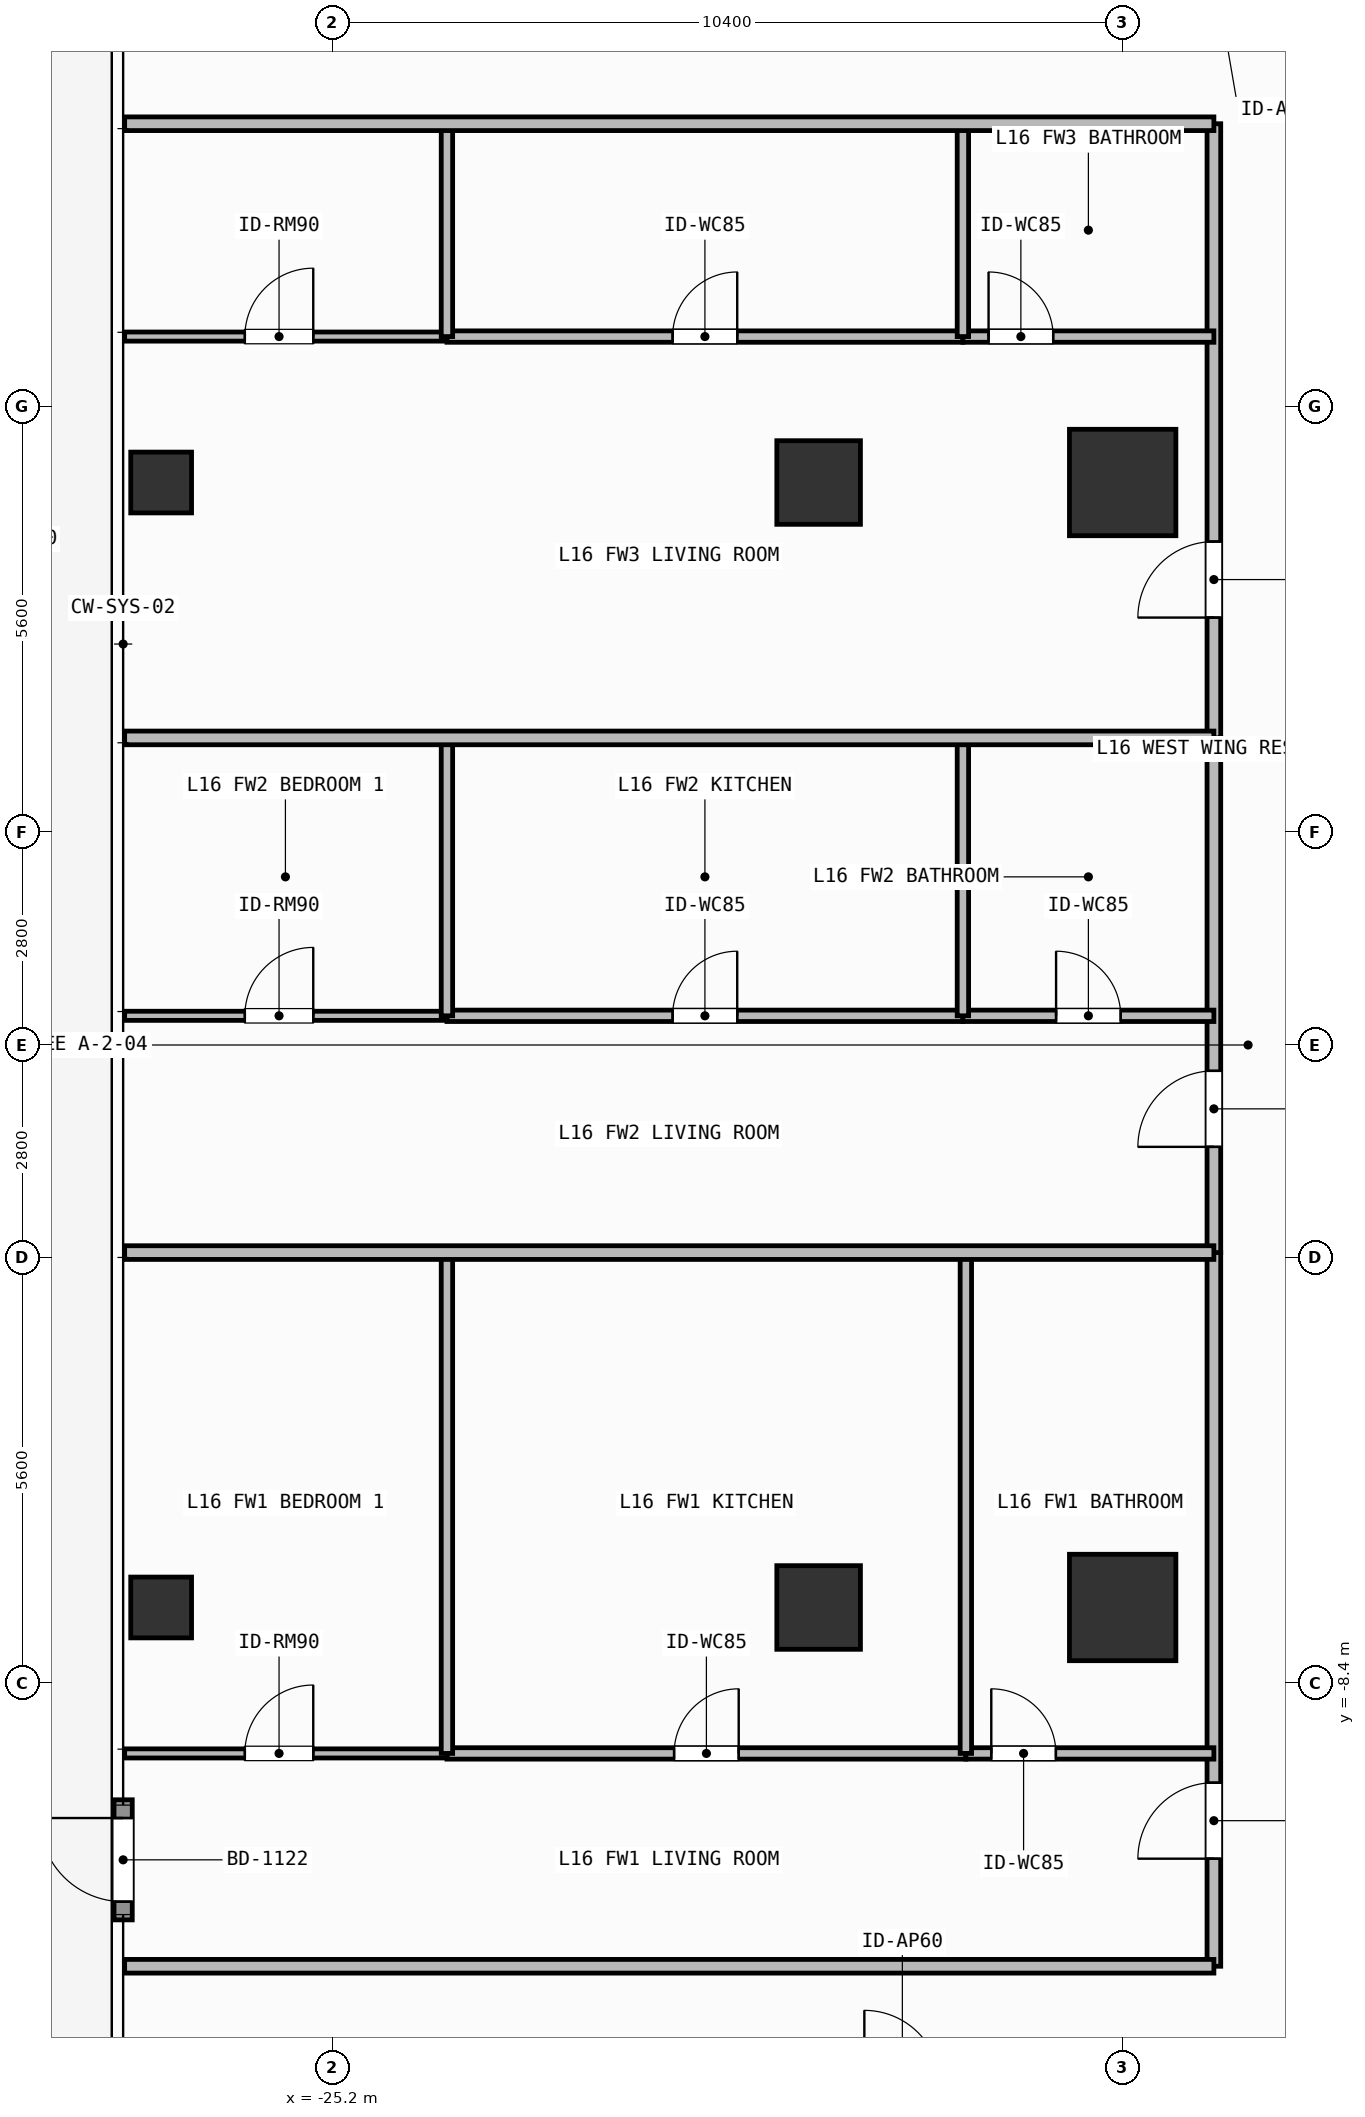
"""IFC4 building model, lengths in metres.
Left out: names, types, materials, properties, quantities, classifications, styles, units other than length and angle.
Written with IfcOpenShell. Run it as: python <this file> out.ifc"""

import sys

from ifc_helpers import new_model, si_unit, direction, frame, frame_2d, origin, origin_2d, place, context, subcontext, project, spatial, rectangle, hollow_rectangle, extrude, element, fill, save


model = new_model("IFC4")
c1 = context("Model", 3, precision=1e-05, world=origin(), true_north=direction((0.0, 1.0)))
c2 = subcontext(c1, "Body", "Model", "MODEL_VIEW")
j1 = project(units=[si_unit("LENGTHUNIT", "METRE"), si_unit("PLANEANGLEUNIT", "RADIAN")], contexts=[c1])
p1 = place(None, origin())
s1 = spatial("IfcSite", under=j1, at=p1, CompositionType="ELEMENT")
p2 = place(p1, origin())
s2 = spatial("IfcBuilding", under=s1, at=p2, CompositionType="ELEMENT")
p3 = place(p2, frame((0.0, 0.0, 61.8)))
s3 = spatial("IfcBuildingStorey", under=s2, at=p3, CompositionType="ELEMENT", Elevation=61.8)
for number, where, z_axis, x_axis in (
    (1, (-14.8, -7.4, 0.0), (0.0, 0.0, 1.0), (1.0, 0.0, 0.0)),
    (2, (-14.8, 7.4, 0.0), (0.0, 0.0, 1.0), (1.0, 0.0, 0.0)),
):
    element("IfcColumn", number, at=place(p3, frame(where, z_axis=z_axis, x_axis=x_axis)), inside=s3, PredefinedType="COLUMN", context=c2, shape_type="SweptSolid", body=[
        extrude(rectangle(XDim=1.4, YDim=1.4, at=origin_2d()), origin(), (0.0, 0.0, 1.0), 3.9),
    ])
for number, where, z_axis, x_axis in (
    (3, (-18.8, -7.4, 0.0), (0.0, 0.0, 1.0), (1.0, 0.0, 0.0)),
    (4, (-18.8, 7.4, 0.0), (0.0, 0.0, 1.0), (1.0, 0.0, 0.0)),
):
    element("IfcColumn", number, at=place(p3, frame(where, z_axis=z_axis, x_axis=x_axis)), inside=s3, PredefinedType="COLUMN", context=c2, shape_type="SweptSolid", body=[
        extrude(rectangle(XDim=1.1, YDim=1.1, at=origin_2d()), origin(), (0.0, 0.0, 1.0), 3.9),
    ])
for number, where, z_axis, x_axis in (
    (5, (-27.45, -7.4, 0.0), (0.0, 0.0, 1.0), (1.0, 0.0, 0.0)),
    (6, (-27.45, 7.4, 0.0), (0.0, 0.0, 1.0), (1.0, 0.0, 0.0)),
):
    element("IfcColumn", number, at=place(p3, frame(where, z_axis=z_axis, x_axis=x_axis)), inside=s3, PredefinedType="COLUMN", context=c2, shape_type="SweptSolid", body=[
        extrude(hollow_rectangle(XDim=0.8, YDim=0.8, WallThickness=0.036, at=origin_2d()), origin(), (0.0, 0.0, 1.0), 3.9),
    ])
p4 = place(p3, frame((-27.95, -11.51, 0.0), z_axis=(0.0, 0.0, 1.0), x_axis=(0.0, 1.0, 0.0)))
e7 = element("IfcWall", 7, at=p4, inside=s3, PredefinedType="SOLIDWALL", context=c2, shape_type="SweptSolid", body=[
    extrude(rectangle(XDim=1.58, YDim=0.24, at=frame_2d((0.79, 0.0))), origin(), (0.0, 0.0, 1.0), 3.68),
])
p5 = place(p4, frame((0.24, 0.0, 0.0)))
e8 = element("IfcOpeningElement", 8, at=p5, cuts=e7, PredefinedType="OPENING", context=c2, shape_type="SweptSolid", body=[
    extrude(rectangle(XDim=1.1, YDim=2.2, at=frame_2d((0.55, 1.1))), frame((0.0, 0.13, 0.0), z_axis=(0.0, -1.0, 0.0), x_axis=(1.0, 0.0, 0.0)), (0.0, 0.0, 1.0), 0.26),
])
p6 = place(p3, frame((-13.6, -12.12, 0.0), z_axis=(0.0, 0.0, 1.0), x_axis=(0.0, 1.0, 0.0)))
e9 = element("IfcWall", 9, at=p6, inside=s3, PredefinedType="PARTITIONING", context=c2, shape_type="SweptSolid", body=[
    extrude(rectangle(XDim=9.389, YDim=0.18, at=frame_2d((4.695, 0.0))), origin(), (0.0, 0.0, 1.0), 3.68),
])
p7 = place(p6, frame((1.415, 0.0, 0.0)))
e10 = element("IfcOpeningElement", 10, at=p7, cuts=e9, PredefinedType="OPENING", context=c2, shape_type="SweptSolid", body=[
    extrude(rectangle(XDim=1.0, YDim=2.2, at=frame_2d((0.5, 1.1))), frame((0.0, 0.1, 0.0), z_axis=(0.0, -1.0, 0.0), x_axis=(1.0, 0.0, 0.0)), (0.0, 0.0, 1.0), 0.2),
])
p8 = place(p3, frame((-23.69, -9.32, 0.0), z_axis=(0.0, 0.0, 1.0), x_axis=(1.0, 0.0, 0.0)))
e11 = element("IfcWall", 11, at=p8, inside=s3, PredefinedType="PARTITIONING", context=c2, shape_type="SweptSolid", body=[
    extrude(rectangle(XDim=6.827, YDim=0.15, at=frame_2d((3.414, 0.0))), origin(), (0.0, 0.0, 1.0), 3.68),
])
p9 = place(p8, frame((2.989, 0.0, 0.0)))
e12 = element("IfcOpeningElement", 12, at=p9, cuts=e11, PredefinedType="OPENING", context=c2, shape_type="SweptSolid", body=[
    extrude(rectangle(XDim=0.85, YDim=2.1, at=frame_2d((0.425, 1.05))), frame((0.0, 0.085, 0.0), z_axis=(0.0, -1.0, 0.0), x_axis=(1.0, 0.0, 0.0)), (0.0, 0.0, 1.0), 0.17),
])
p10 = place(p3, frame((-16.863, -9.32, 0.0), z_axis=(0.0, 0.0, 1.0), x_axis=(1.0, 0.0, 0.0)))
e13 = element("IfcWall", 13, at=p10, inside=s3, PredefinedType="PARTITIONING", context=c2, shape_type="SweptSolid", body=[
    extrude(rectangle(XDim=3.263, YDim=0.15, at=frame_2d((1.631, 0.0))), origin(), (0.0, 0.0, 1.0), 3.68),
])
p11 = place(p10, frame((0.334, 0.0, 0.0)))
e14 = element("IfcOpeningElement", 14, at=p11, cuts=e13, PredefinedType="OPENING", context=c2, shape_type="SweptSolid", body=[
    extrude(rectangle(XDim=0.85, YDim=2.1, at=frame_2d((0.425, 1.05))), frame((0.0, 0.085, 0.0), z_axis=(0.0, -1.0, 0.0), x_axis=(1.0, 0.0, 0.0)), (0.0, 0.0, 1.0), 0.17),
])
p12 = place(p3, frame((-27.93, -9.32, 0.0), z_axis=(0.0, 0.0, 1.0), x_axis=(1.0, 0.0, 0.0)))
e15 = element("IfcWall", 15, at=p12, inside=s3, PredefinedType="PARTITIONING", context=c2, shape_type="SweptSolid", body=[
    extrude(rectangle(XDim=4.24, YDim=0.12, at=frame_2d((2.12, 0.0))), origin(), (0.0, 0.0, 1.0), 3.68),
])
p13 = place(p12, frame((1.581, 0.0, 0.0)))
e16 = element("IfcOpeningElement", 16, at=p13, cuts=e15, PredefinedType="OPENING", context=c2, shape_type="SweptSolid", body=[
    extrude(rectangle(XDim=0.9, YDim=2.1, at=frame_2d((0.45, 1.05))), frame((0.0, 0.07, 0.0), z_axis=(0.0, -1.0, 0.0), x_axis=(1.0, 0.0, 0.0)), (0.0, 0.0, 1.0), 0.14),
])
p14 = place(p3, frame((-13.6, -2.731, 0.0), z_axis=(0.0, 0.0, 1.0), x_axis=(0.0, 1.0, 0.0)))
e17 = element("IfcWall", 17, at=p14, inside=s3, PredefinedType="PARTITIONING", context=c2, shape_type="SweptSolid", body=[
    extrude(rectangle(XDim=6.771, YDim=0.18, at=frame_2d((3.385, 0.0))), origin(), (0.0, 0.0, 1.0), 3.68),
])
p15 = place(p14, frame((1.391, 0.0, 0.0)))
e18 = element("IfcOpeningElement", 18, at=p15, cuts=e17, PredefinedType="OPENING", context=c2, shape_type="SweptSolid", body=[
    extrude(rectangle(XDim=1.0, YDim=2.2, at=frame_2d((0.5, 1.1))), frame((0.0, 0.1, 0.0), z_axis=(0.0, -1.0, 0.0), x_axis=(1.0, 0.0, 0.0)), (0.0, 0.0, 1.0), 0.2),
])
p16 = place(p3, frame((-23.69, 0.384, 0.0), z_axis=(0.0, 0.0, 1.0), x_axis=(1.0, 0.0, 0.0)))
e19 = element("IfcWall", 19, at=p16, inside=s3, PredefinedType="PARTITIONING", context=c2, shape_type="SweptSolid", body=[
    extrude(rectangle(XDim=6.788, YDim=0.15, at=frame_2d((3.394, 0.0))), origin(), (0.0, 0.0, 1.0), 3.68),
])
p17 = place(p16, frame((2.969, 0.0, 0.0)))
e20 = element("IfcOpeningElement", 20, at=p17, cuts=e19, PredefinedType="OPENING", context=c2, shape_type="SweptSolid", body=[
    extrude(rectangle(XDim=0.85, YDim=2.1, at=frame_2d((0.425, 1.05))), frame((0.0, 0.085, 0.0), z_axis=(0.0, -1.0, 0.0), x_axis=(1.0, 0.0, 0.0)), (0.0, 0.0, 1.0), 0.17),
])
p18 = place(p3, frame((-16.902, 0.384, 0.0), z_axis=(0.0, 0.0, 1.0), x_axis=(1.0, 0.0, 0.0)))
e21 = element("IfcWall", 21, at=p18, inside=s3, PredefinedType="PARTITIONING", context=c2, shape_type="SweptSolid", body=[
    extrude(rectangle(XDim=3.302, YDim=0.15, at=frame_2d((1.651, 0.0))), origin(), (0.0, 0.0, 1.0), 3.68),
])
p19 = place(p18, frame((1.226, 0.0, 0.0)))
e22 = element("IfcOpeningElement", 22, at=p19, cuts=e21, PredefinedType="OPENING", context=c2, shape_type="SweptSolid", body=[
    extrude(rectangle(XDim=0.85, YDim=2.1, at=frame_2d((0.425, 1.05))), frame((0.0, 0.085, 0.0), z_axis=(0.0, -1.0, 0.0), x_axis=(1.0, 0.0, 0.0)), (0.0, 0.0, 1.0), 0.17),
])
p20 = place(p3, frame((-27.93, 0.384, 0.0), z_axis=(0.0, 0.0, 1.0), x_axis=(1.0, 0.0, 0.0)))
e23 = element("IfcWall", 23, at=p20, inside=s3, PredefinedType="PARTITIONING", context=c2, shape_type="SweptSolid", body=[
    extrude(rectangle(XDim=4.24, YDim=0.12, at=frame_2d((2.12, 0.0))), origin(), (0.0, 0.0, 1.0), 3.68),
])
p21 = place(p20, frame((1.581, 0.0, 0.0)))
e24 = element("IfcOpeningElement", 24, at=p21, cuts=e23, PredefinedType="OPENING", context=c2, shape_type="SweptSolid", body=[
    extrude(rectangle(XDim=0.9, YDim=2.1, at=frame_2d((0.45, 1.05))), frame((0.0, 0.07, 0.0), z_axis=(0.0, -1.0, 0.0), x_axis=(1.0, 0.0, 0.0)), (0.0, 0.0, 1.0), 0.14),
])
p22 = place(p3, frame((-13.6, 4.04, 0.0), z_axis=(0.0, 0.0, 1.0), x_axis=(0.0, 1.0, 0.0)))
e25 = element("IfcWall", 25, at=p22, inside=s3, PredefinedType="PARTITIONING", context=c2, shape_type="SweptSolid", body=[
    extrude(rectangle(XDim=8.08, YDim=0.18, at=frame_2d((4.04, 0.0))), origin(), (0.0, 0.0, 1.0), 3.68),
])
p23 = place(p22, frame((1.583, 0.0, 0.0)))
e26 = element("IfcOpeningElement", 26, at=p23, cuts=e25, PredefinedType="OPENING", context=c2, shape_type="SweptSolid", body=[
    extrude(rectangle(XDim=1.0, YDim=2.2, at=frame_2d((0.5, 1.1))), frame((0.0, 0.1, 0.0), z_axis=(0.0, -1.0, 0.0), x_axis=(1.0, 0.0, 0.0)), (0.0, 0.0, 1.0), 0.2),
])
p24 = place(p3, frame((-23.69, 9.32, 0.0), z_axis=(0.0, 0.0, 1.0), x_axis=(1.0, 0.0, 0.0)))
e27 = element("IfcWall", 27, at=p24, inside=s3, PredefinedType="PARTITIONING", context=c2, shape_type="SweptSolid", body=[
    extrude(rectangle(XDim=6.788, YDim=0.15, at=frame_2d((3.394, 0.0))), origin(), (0.0, 0.0, 1.0), 3.68),
])
p25 = place(p24, frame((2.969, 0.0, 0.0)))
e28 = element("IfcOpeningElement", 28, at=p25, cuts=e27, PredefinedType="OPENING", context=c2, shape_type="SweptSolid", body=[
    extrude(rectangle(XDim=0.85, YDim=2.1, at=frame_2d((0.425, 1.05))), frame((0.0, 0.085, 0.0), z_axis=(0.0, -1.0, 0.0), x_axis=(1.0, 0.0, 0.0)), (0.0, 0.0, 1.0), 0.17),
])
p26 = place(p3, frame((-16.902, 9.32, 0.0), z_axis=(0.0, 0.0, 1.0), x_axis=(1.0, 0.0, 0.0)))
e29 = element("IfcWall", 29, at=p26, inside=s3, PredefinedType="PARTITIONING", context=c2, shape_type="SweptSolid", body=[
    extrude(rectangle(XDim=3.302, YDim=0.15, at=frame_2d((1.651, 0.0))), origin(), (0.0, 0.0, 1.0), 3.68),
])
p27 = place(p26, frame((0.338, 0.0, 0.0)))
e30 = element("IfcOpeningElement", 30, at=p27, cuts=e29, PredefinedType="OPENING", context=c2, shape_type="SweptSolid", body=[
    extrude(rectangle(XDim=0.85, YDim=2.1, at=frame_2d((0.425, 1.05))), frame((0.0, 0.085, 0.0), z_axis=(0.0, -1.0, 0.0), x_axis=(1.0, 0.0, 0.0)), (0.0, 0.0, 1.0), 0.17),
])
p28 = place(p3, frame((-27.93, 9.32, 0.0), z_axis=(0.0, 0.0, 1.0), x_axis=(1.0, 0.0, 0.0)))
e31 = element("IfcWall", 31, at=p28, inside=s3, PredefinedType="PARTITIONING", context=c2, shape_type="SweptSolid", body=[
    extrude(rectangle(XDim=4.24, YDim=0.12, at=frame_2d((2.12, 0.0))), origin(), (0.0, 0.0, 1.0), 3.68),
])
p29 = place(p28, frame((1.581, 0.0, 0.0)))
e32 = element("IfcOpeningElement", 32, at=p29, cuts=e31, PredefinedType="OPENING", context=c2, shape_type="SweptSolid", body=[
    extrude(rectangle(XDim=0.9, YDim=2.1, at=frame_2d((0.45, 1.05))), frame((0.0, 0.07, 0.0), z_axis=(0.0, -1.0, 0.0), x_axis=(1.0, 0.0, 0.0)), (0.0, 0.0, 1.0), 0.14),
])
for number, where, z_axis, x_axis in (
    (33, (-16.863, -9.32, 0.0), (0.0, 0.0, 1.0), (0.0, 1.0, 0.0)),
    (34, (-23.69, -9.32, 0.0), (0.0, 0.0, 1.0), (0.0, 1.0, 0.0)),
):
    element("IfcWall", number, at=place(p3, frame(where, z_axis=z_axis, x_axis=x_axis)), inside=s3, PredefinedType="PARTITIONING", context=c2, shape_type="SweptSolid", body=[
        extrude(rectangle(XDim=6.589, YDim=0.15, at=frame_2d((3.294, 0.0))), origin(), (0.0, 0.0, 1.0), 3.68),
    ])
for number, where, z_axis, x_axis in (
    (35, (-16.902, 0.384, 0.0), (0.0, 0.0, 1.0), (0.0, 1.0, 0.0)),
    (36, (-23.69, 0.384, 0.0), (0.0, 0.0, 1.0), (0.0, 1.0, 0.0)),
):
    element("IfcWall", number, at=place(p3, frame(where, z_axis=z_axis, x_axis=x_axis)), inside=s3, PredefinedType="PARTITIONING", context=c2, shape_type="SweptSolid", body=[
        extrude(rectangle(XDim=3.656, YDim=0.15, at=frame_2d((1.828, 0.0))), origin(), (0.0, 0.0, 1.0), 3.68),
    ])
p30 = place(p3, frame((-27.93, -2.731, 0.0), z_axis=(0.0, 0.0, 1.0), x_axis=(1.0, 0.0, 0.0)))
e37 = element("IfcWall", 37, at=p30, inside=s3, PredefinedType="PARTITIONING", context=c2, shape_type="SweptSolid", body=[
    extrude(rectangle(XDim=14.33, YDim=0.18, at=frame_2d((7.165, 0.0))), origin(), (0.0, 0.0, 1.0), 3.68),
])
for number, where, z_axis, x_axis in (
    (38, (-16.902, 9.32, 0.0), (0.0, 0.0, 1.0), (0.0, 1.0, 0.0)),
    (39, (-23.69, 9.32, 0.0), (0.0, 0.0, 1.0), (0.0, 1.0, 0.0)),
):
    element("IfcWall", number, at=place(p3, frame(where, z_axis=z_axis, x_axis=x_axis)), inside=s3, PredefinedType="PARTITIONING", context=c2, shape_type="SweptSolid", body=[
        extrude(rectangle(XDim=2.8, YDim=0.15, at=frame_2d((1.4, 0.0))), origin(), (0.0, 0.0, 1.0), 3.68),
    ])
for number, where, z_axis, x_axis in (
    (40, (-27.93, 4.04, 0.0), (0.0, 0.0, 1.0), (1.0, 0.0, 0.0)),
    (41, (-27.93, -12.12, 0.0), (0.0, 0.0, 1.0), (1.0, 0.0, 0.0)),
    (42, (-27.93, 12.12, 0.0), (0.0, 0.0, 1.0), (1.0, 0.0, 0.0)),
):
    element("IfcWall", number, at=place(p3, frame(where, z_axis=z_axis, x_axis=x_axis)), inside=s3, PredefinedType="PARTITIONING", context=c2, shape_type="SweptSolid", body=[
        extrude(rectangle(XDim=14.33, YDim=0.18, at=frame_2d((7.165, 0.0))), origin(), (0.0, 0.0, 1.0), 3.68),
    ])
p31 = place(p5, origin())
e43 = element("IfcDoor", 43, at=p31, inside=s3, OperationType="SINGLE_SWING_RIGHT", PredefinedType="DOOR", context=c2, shape_type="SweptSolid", body=[
    extrude(rectangle(XDim=1.1, YDim=2.2, at=frame_2d((0.55, 1.1))), frame((0.0, 0.025, 0.0), z_axis=(0.0, -1.0, 0.0), x_axis=(1.0, 0.0, 0.0)), (0.0, 0.0, 1.0), 0.05),
])
fill(e8, e43)
p32 = place(p7, origin())
e44 = element("IfcDoor", 44, at=p32, inside=s3, OperationType="SINGLE_SWING_LEFT", PredefinedType="DOOR", context=c2, shape_type="SweptSolid", body=[
    extrude(rectangle(XDim=1.0, YDim=2.2, at=frame_2d((0.5, 1.1))), frame((0.0, 0.025, 0.0), z_axis=(0.0, -1.0, 0.0), x_axis=(1.0, 0.0, 0.0)), (0.0, 0.0, 1.0), 0.05),
])
fill(e10, e44)
p33 = place(p9, origin())
e45 = element("IfcDoor", 45, at=p33, inside=s3, OperationType="SINGLE_SWING_RIGHT", PredefinedType="DOOR", context=c2, shape_type="SweptSolid", body=[
    extrude(rectangle(XDim=0.85, YDim=2.1, at=frame_2d((0.425, 1.05))), frame((0.0, 0.025, 0.0), z_axis=(0.0, -1.0, 0.0), x_axis=(1.0, 0.0, 0.0)), (0.0, 0.0, 1.0), 0.05),
])
fill(e12, e45)
p34 = place(p11, origin())
e46 = element("IfcDoor", 46, at=p34, inside=s3, OperationType="SINGLE_SWING_LEFT", PredefinedType="DOOR", context=c2, shape_type="SweptSolid", body=[
    extrude(rectangle(XDim=0.85, YDim=2.1, at=frame_2d((0.425, 1.05))), frame((0.0, 0.025, 0.0), z_axis=(0.0, -1.0, 0.0), x_axis=(1.0, 0.0, 0.0)), (0.0, 0.0, 1.0), 0.05),
])
fill(e14, e46)
p35 = place(p13, origin())
e47 = element("IfcDoor", 47, at=p35, inside=s3, OperationType="SINGLE_SWING_RIGHT", PredefinedType="DOOR", context=c2, shape_type="SweptSolid", body=[
    extrude(rectangle(XDim=0.9, YDim=2.1, at=frame_2d((0.45, 1.05))), frame((0.0, 0.025, 0.0), z_axis=(0.0, -1.0, 0.0), x_axis=(1.0, 0.0, 0.0)), (0.0, 0.0, 1.0), 0.05),
])
fill(e16, e47)
p36 = place(p15, origin())
e48 = element("IfcDoor", 48, at=p36, inside=s3, OperationType="SINGLE_SWING_LEFT", PredefinedType="DOOR", context=c2, shape_type="SweptSolid", body=[
    extrude(rectangle(XDim=1.0, YDim=2.2, at=frame_2d((0.5, 1.1))), frame((0.0, 0.025, 0.0), z_axis=(0.0, -1.0, 0.0), x_axis=(1.0, 0.0, 0.0)), (0.0, 0.0, 1.0), 0.05),
])
fill(e18, e48)
p37 = place(p17, origin())
e49 = element("IfcDoor", 49, at=p37, inside=s3, OperationType="SINGLE_SWING_RIGHT", PredefinedType="DOOR", context=c2, shape_type="SweptSolid", body=[
    extrude(rectangle(XDim=0.85, YDim=2.1, at=frame_2d((0.425, 1.05))), frame((0.0, 0.025, 0.0), z_axis=(0.0, -1.0, 0.0), x_axis=(1.0, 0.0, 0.0)), (0.0, 0.0, 1.0), 0.05),
])
fill(e20, e49)
p38 = place(p19, origin())
e50 = element("IfcDoor", 50, at=p38, inside=s3, OperationType="SINGLE_SWING_LEFT", PredefinedType="DOOR", context=c2, shape_type="SweptSolid", body=[
    extrude(rectangle(XDim=0.85, YDim=2.1, at=frame_2d((0.425, 1.05))), frame((0.0, 0.025, 0.0), z_axis=(0.0, -1.0, 0.0), x_axis=(1.0, 0.0, 0.0)), (0.0, 0.0, 1.0), 0.05),
])
fill(e22, e50)
p39 = place(p21, origin())
e51 = element("IfcDoor", 51, at=p39, inside=s3, OperationType="SINGLE_SWING_RIGHT", PredefinedType="DOOR", context=c2, shape_type="SweptSolid", body=[
    extrude(rectangle(XDim=0.9, YDim=2.1, at=frame_2d((0.45, 1.05))), frame((0.0, 0.025, 0.0), z_axis=(0.0, -1.0, 0.0), x_axis=(1.0, 0.0, 0.0)), (0.0, 0.0, 1.0), 0.05),
])
fill(e24, e51)
p40 = place(p23, origin())
e52 = element("IfcDoor", 52, at=p40, inside=s3, OperationType="SINGLE_SWING_LEFT", PredefinedType="DOOR", context=c2, shape_type="SweptSolid", body=[
    extrude(rectangle(XDim=1.0, YDim=2.2, at=frame_2d((0.5, 1.1))), frame((0.0, 0.025, 0.0), z_axis=(0.0, -1.0, 0.0), x_axis=(1.0, 0.0, 0.0)), (0.0, 0.0, 1.0), 0.05),
])
fill(e26, e52)
p41 = place(p25, origin())
e53 = element("IfcDoor", 53, at=p41, inside=s3, OperationType="SINGLE_SWING_RIGHT", PredefinedType="DOOR", context=c2, shape_type="SweptSolid", body=[
    extrude(rectangle(XDim=0.85, YDim=2.1, at=frame_2d((0.425, 1.05))), frame((0.0, 0.025, 0.0), z_axis=(0.0, -1.0, 0.0), x_axis=(1.0, 0.0, 0.0)), (0.0, 0.0, 1.0), 0.05),
])
fill(e28, e53)
p42 = place(p27, origin())
e54 = element("IfcDoor", 54, at=p42, inside=s3, OperationType="SINGLE_SWING_LEFT", PredefinedType="DOOR", context=c2, shape_type="SweptSolid", body=[
    extrude(rectangle(XDim=0.85, YDim=2.1, at=frame_2d((0.425, 1.05))), frame((0.0, 0.025, 0.0), z_axis=(0.0, -1.0, 0.0), x_axis=(1.0, 0.0, 0.0)), (0.0, 0.0, 1.0), 0.05),
])
fill(e30, e54)
p43 = place(p29, origin())
e55 = element("IfcDoor", 55, at=p43, inside=s3, OperationType="SINGLE_SWING_RIGHT", PredefinedType="DOOR", context=c2, shape_type="SweptSolid", body=[
    extrude(rectangle(XDim=0.9, YDim=2.1, at=frame_2d((0.45, 1.05))), frame((0.0, 0.025, 0.0), z_axis=(0.0, -1.0, 0.0), x_axis=(1.0, 0.0, 0.0)), (0.0, 0.0, 1.0), 0.05),
])
fill(e32, e55)
save(model, sys.argv[1])
